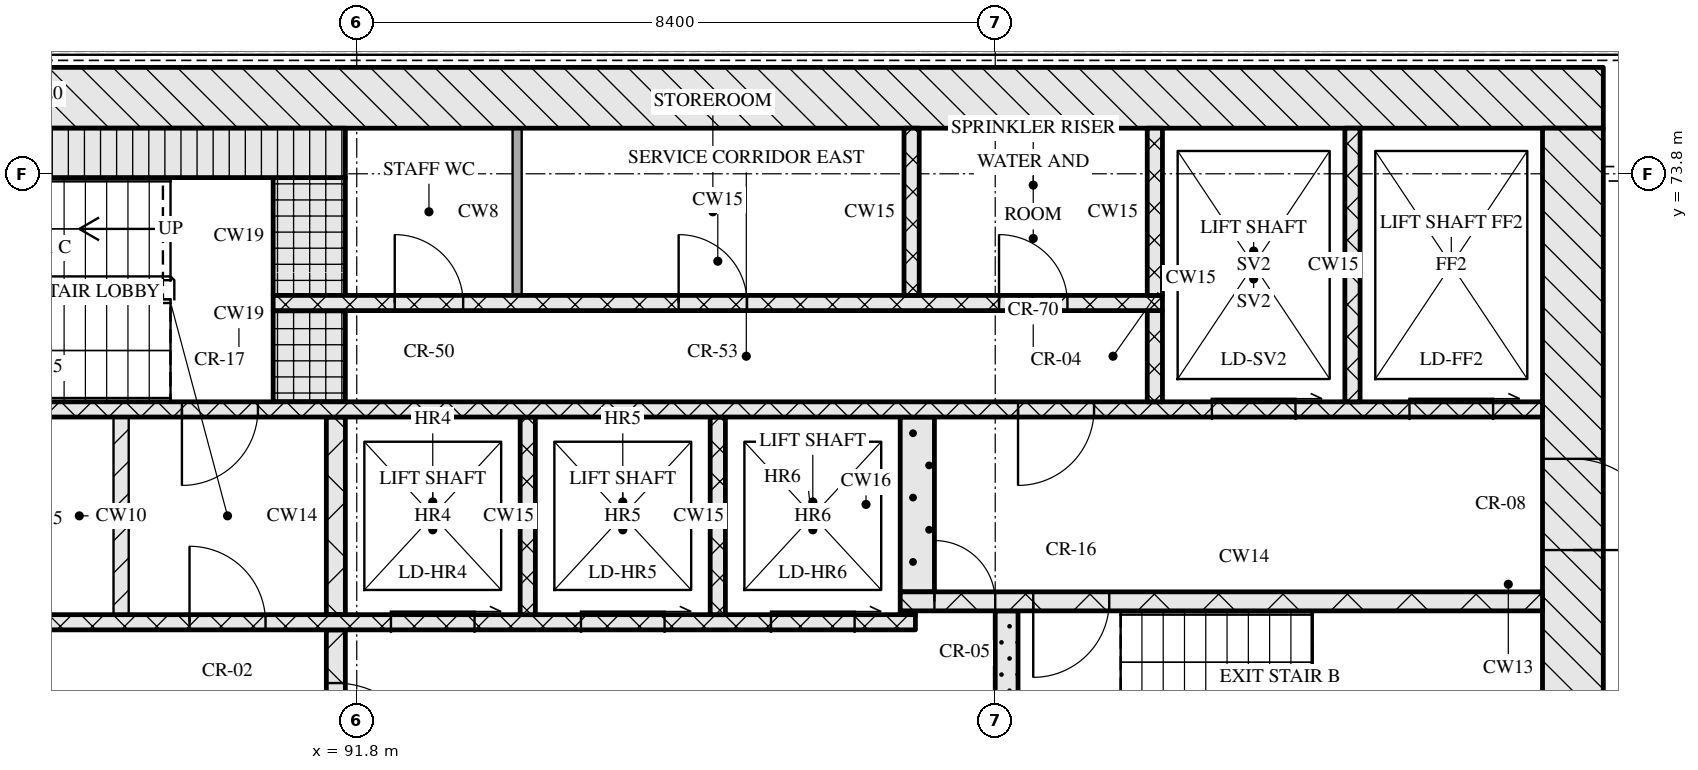
"""IFC4 building model, lengths in metres.
Left out: names, types, materials, properties, quantities, classifications, styles, units other than length and angle.
Written with IfcOpenShell. Run it as: python <this file> out.ifc"""

import sys

from ifc_helpers import new_model, si_unit, direction, frame, frame_2d, origin, place, context, subcontext, project, spatial, rectangle, extrude, element, fill, save


model = new_model("IFC4")
c1 = context("Model", 3, precision=1e-05, world=origin(), true_north=direction((0.0, 1.0)))
c2 = subcontext(c1, "Body", "Model", "MODEL_VIEW")
j1 = project(units=[si_unit("LENGTHUNIT", "METRE"), si_unit("PLANEANGLEUNIT", "RADIAN")], contexts=[c1])
p1 = place(None, origin())
s1 = spatial("IfcSite", under=j1, at=p1, CompositionType="ELEMENT")
p2 = place(p1, origin())
s2 = spatial("IfcBuilding", under=s1, at=p2, CompositionType="ELEMENT")
p3 = place(p2, frame((0.0, 0.0, 161.85)))
s3 = spatial("IfcBuildingStorey", under=s2, at=p3, CompositionType="ELEMENT", Elevation=161.85)
p4 = place(p3, frame((67.0, 74.8, 0.0), z_axis=(0.0, 0.0, 1.0), x_axis=(1.0, 0.0, 0.0)))
e1 = element("IfcWall", 1, at=p4, inside=s3, PredefinedType="SOLIDWALL", context=c2, shape_type="SweptSolid", body=[
    extrude(rectangle(XDim=41.2, YDim=0.8, at=frame_2d((20.6, 0.0))), origin(), (0.0, 0.0, 1.0), 3.32),
])
p5 = place(p3, frame((107.8, 62.4, 0.0), z_axis=(0.0, 0.0, 1.0), x_axis=(0.0, 1.0, 0.0)))
e2 = element("IfcWall", 2, at=p5, inside=s3, PredefinedType="SOLIDWALL", context=c2, shape_type="SweptSolid", body=[
    extrude(rectangle(XDim=12.0, YDim=0.8, at=frame_2d((6.0, 0.0))), origin(), (0.0, 0.0, 1.0), 3.32),
])
p6 = place(p5, frame((6.45, 0.0, 0.0)))
e3 = element("IfcOpeningElement", 3, at=p6, cuts=e2, PredefinedType="OPENING", context=c2, shape_type="SweptSolid", body=[
    extrude(rectangle(XDim=1.2, YDim=2.1, at=frame_2d((0.6, 1.05))), frame((0.0, 0.41, 0.0), z_axis=(0.0, -1.0, 0.0), x_axis=(1.0, 0.0, 0.0)), (0.0, 0.0, 1.0), 0.82),
])
p7 = place(p3, frame((91.525, 65.2, 0.0), z_axis=(0.0, 0.0, 1.0), x_axis=(0.0, 1.0, 0.0)))
e4 = element("IfcWall", 4, at=p7, inside=s3, PredefinedType="SOLIDWALL", context=c2, shape_type="SweptSolid", body=[
    extrude(rectangle(XDim=2.6, YDim=0.25, at=frame_2d((1.3, 0.0))), origin(), (0.0, 0.0, 1.0), 3.32),
])
p8 = place(p7, frame((0.7, 0.0, 0.0)))
e5 = element("IfcOpeningElement", 5, at=p8, cuts=e4, PredefinedType="OPENING", context=c2, shape_type="SweptSolid", body=[
    extrude(rectangle(XDim=1.2, YDim=2.1, at=frame_2d((0.6, 1.05))), frame((0.0, 0.135, 0.0), z_axis=(0.0, -1.0, 0.0), x_axis=(1.0, 0.0, 0.0)), (0.0, 0.0, 1.0), 0.27),
])
p9 = place(p3, frame((100.35, 65.2, 0.0), z_axis=(0.0, 0.0, 1.0), x_axis=(0.0, 1.0, 0.0)))
e6 = element("IfcWall", 6, at=p9, inside=s3, PredefinedType="SOLIDWALL", context=c2, shape_type="SweptSolid", body=[
    extrude(rectangle(XDim=2.85, YDim=0.3, at=frame_2d((1.425, 0.0))), origin(), (0.0, 0.0, 1.0), 3.32),
])
p10 = place(p3, frame((76.05, 67.9, 0.0), z_axis=(0.0, 0.0, 1.0), x_axis=(1.0, 0.0, 0.0)))
e7 = element("IfcWall", 7, at=p10, inside=s3, PredefinedType="SOLIDWALL", context=c2, shape_type="SweptSolid", body=[
    extrude(rectangle(XDim=23.1, YDim=0.2, at=frame_2d((11.55, 0.0))), origin(), (0.0, 0.0, 1.0), 3.32),
])
p11 = place(p10, frame((3.2, 0.0, 0.0)))
e8 = element("IfcOpeningElement", 8, at=p11, cuts=e7, PredefinedType="OPENING", context=c2, shape_type="SweptSolid", body=[
    extrude(rectangle(XDim=0.9, YDim=2.1, at=frame_2d((0.45, 1.05))), frame((0.0, 0.11, 0.0), z_axis=(0.0, -1.0, 0.0), x_axis=(1.0, 0.0, 0.0)), (0.0, 0.0, 1.0), 0.22),
])
p12 = place(p10, frame((9.7, 0.0, 0.0)))
e9 = element("IfcOpeningElement", 9, at=p12, cuts=e7, PredefinedType="OPENING", context=c2, shape_type="SweptSolid", body=[
    extrude(rectangle(XDim=0.9, YDim=2.1, at=frame_2d((0.45, 1.05))), frame((0.0, 0.11, 0.0), z_axis=(0.0, -1.0, 0.0), x_axis=(1.0, 0.0, 0.0)), (0.0, 0.0, 1.0), 0.22),
])
p13 = place(p10, frame((13.55, 0.0, 0.0)))
e10 = element("IfcOpeningElement", 10, at=p13, cuts=e7, PredefinedType="OPENING", context=c2, shape_type="SweptSolid", body=[
    extrude(rectangle(XDim=1.0, YDim=2.1, at=frame_2d((0.5, 1.05))), frame((0.0, 0.11, 0.0), z_axis=(0.0, -1.0, 0.0), x_axis=(1.0, 0.0, 0.0)), (0.0, 0.0, 1.0), 0.22),
])
p14 = place(p10, frame((16.2, 0.0, 0.0)))
e11 = element("IfcOpeningElement", 11, at=p14, cuts=e7, PredefinedType="OPENING", context=c2, shape_type="SweptSolid", body=[
    extrude(rectangle(XDim=1.1, YDim=2.1, at=frame_2d((0.55, 1.05))), frame((0.0, 0.11, 0.0), z_axis=(0.0, -1.0, 0.0), x_axis=(1.0, 0.0, 0.0)), (0.0, 0.0, 1.0), 0.22),
])
p15 = place(p10, frame((18.7, 0.0, 0.0)))
e12 = element("IfcOpeningElement", 12, at=p15, cuts=e7, PredefinedType="OPENING", context=c2, shape_type="SweptSolid", body=[
    extrude(rectangle(XDim=1.1, YDim=2.1, at=frame_2d((0.55, 1.05))), frame((0.0, 0.11, 0.0), z_axis=(0.0, -1.0, 0.0), x_axis=(1.0, 0.0, 0.0)), (0.0, 0.0, 1.0), 0.22),
])
p16 = place(p10, frame((21.2, 0.0, 0.0)))
e13 = element("IfcOpeningElement", 13, at=p16, cuts=e7, PredefinedType="OPENING", context=c2, shape_type="SweptSolid", body=[
    extrude(rectangle(XDim=1.1, YDim=2.1, at=frame_2d((0.55, 1.05))), frame((0.0, 0.11, 0.0), z_axis=(0.0, -1.0, 0.0), x_axis=(1.0, 0.0, 0.0)), (0.0, 0.0, 1.0), 0.22),
])
p17 = place(p3, frame((88.7, 68.0, 0.0), z_axis=(0.0, 0.0, 1.0), x_axis=(0.0, 1.0, 0.0)))
e14 = element("IfcWall", 14, at=p17, inside=s3, PredefinedType="PARTITIONING", context=c2, shape_type="SweptSolid", body=[
    extrude(rectangle(XDim=2.6, YDim=0.2, at=frame_2d((1.3, 0.0))), origin(), (0.0, 0.0, 1.0), 3.32),
])
p18 = place(p3, frame((91.525, 68.0, 0.0), z_axis=(0.0, 0.0, 1.0), x_axis=(0.0, 1.0, 0.0)))
e15 = element("IfcWall", 15, at=p18, inside=s3, PredefinedType="SOLIDWALL", context=c2, shape_type="SweptSolid", body=[
    extrude(rectangle(XDim=2.6, YDim=0.25, at=frame_2d((1.3, 0.0))), origin(), (0.0, 0.0, 1.0), 3.32),
])
for number, where, z_axis, x_axis in (
    (16, (94.05, 68.0, 0.0), (0.0, 0.0, 1.0), (0.0, 1.0, 0.0)),
    (17, (96.55, 68.0, 0.0), (0.0, 0.0, 1.0), (0.0, 1.0, 0.0)),
):
    element("IfcWall", number, at=place(p3, frame(where, z_axis=z_axis, x_axis=x_axis)), inside=s3, PredefinedType="SOLIDWALL", context=c2, shape_type="SweptSolid", body=[
        extrude(rectangle(XDim=2.6, YDim=0.2, at=frame_2d((1.3, 0.0))), origin(), (0.0, 0.0, 1.0), 3.32),
    ])
p19 = place(p3, frame((98.95, 68.025, 0.0), z_axis=(0.0, 0.0, 1.0), x_axis=(1.0, 0.0, 0.0)))
e18 = element("IfcWall", 18, at=p19, inside=s3, PredefinedType="SOLIDWALL", context=c2, shape_type="SweptSolid", body=[
    extrude(rectangle(XDim=0.2, YDim=0.05, at=frame_2d((0.1, 0.0))), origin(), (0.0, 0.0, 1.0), 3.32),
])
p20 = place(p3, frame((98.95, 68.175, 0.0), z_axis=(0.0, 0.0, 1.0), x_axis=(1.0, 0.0, 0.0)))
e19 = element("IfcWall", 19, at=p20, inside=s3, PredefinedType="SOLIDWALL", context=c2, shape_type="SweptSolid", body=[
    extrude(rectangle(XDim=8.45, YDim=0.25, at=frame_2d((4.225, 0.0))), origin(), (0.0, 0.0, 1.0), 3.32),
])
p21 = place(p20, frame((0.45, 0.0, 0.0)))
e20 = element("IfcOpeningElement", 20, at=p21, cuts=e19, PredefinedType="OPENING", context=c2, shape_type="SweptSolid", body=[
    extrude(rectangle(XDim=0.8, YDim=2.1, at=frame_2d((0.4, 1.05))), frame((0.0, 0.135, 0.0), z_axis=(0.0, -1.0, 0.0), x_axis=(1.0, 0.0, 0.0)), (0.0, 0.0, 1.0), 0.27),
])
p22 = place(p20, frame((1.75, 0.0, 0.0)))
e21 = element("IfcOpeningElement", 21, at=p22, cuts=e19, PredefinedType="OPENING", context=c2, shape_type="SweptSolid", body=[
    extrude(rectangle(XDim=1.0, YDim=2.1, at=frame_2d((0.5, 1.05))), frame((0.0, 0.135, 0.0), z_axis=(0.0, -1.0, 0.0), x_axis=(1.0, 0.0, 0.0)), (0.0, 0.0, 1.0), 0.27),
])
p23 = place(p3, frame((99.175, 68.3, 0.0), z_axis=(0.0, 0.0, 1.0), x_axis=(0.0, 1.0, 0.0)))
e22 = element("IfcWall", 22, at=p23, inside=s3, PredefinedType="SOLIDWALL", context=c2, shape_type="SweptSolid", body=[
    extrude(rectangle(XDim=2.3, YDim=0.45, at=frame_2d((1.15, 0.0))), origin(), (0.0, 0.0, 1.0), 3.32),
])
p24 = place(p3, frame((67.8, 70.7, 0.0), z_axis=(0.0, 0.0, 1.0), x_axis=(1.0, 0.0, 0.0)))
e23 = element("IfcWall", 23, at=p24, inside=s3, PredefinedType="SOLIDWALL", context=c2, shape_type="SweptSolid", body=[
    extrude(rectangle(XDim=39.6, YDim=0.2, at=frame_2d((19.8, 0.0))), origin(), (0.0, 0.0, 1.0), 3.32),
])
p25 = place(p24, frame((0.65, 0.0, 0.0)))
e24 = element("IfcOpeningElement", 24, at=p25, cuts=e23, PredefinedType="OPENING", context=c2, shape_type="SweptSolid", body=[
    extrude(rectangle(XDim=1.1, YDim=2.1, at=frame_2d((0.55, 1.05))), frame((0.0, 0.11, 0.0), z_axis=(0.0, -1.0, 0.0), x_axis=(1.0, 0.0, 0.0)), (0.0, 0.0, 1.0), 0.22),
])
p26 = place(p24, frame((3.25, 0.0, 0.0)))
e25 = element("IfcOpeningElement", 25, at=p26, cuts=e23, PredefinedType="OPENING", context=c2, shape_type="SweptSolid", body=[
    extrude(rectangle(XDim=1.1, YDim=2.1, at=frame_2d((0.55, 1.05))), frame((0.0, 0.11, 0.0), z_axis=(0.0, -1.0, 0.0), x_axis=(1.0, 0.0, 0.0)), (0.0, 0.0, 1.0), 0.22),
])
p27 = place(p24, frame((5.9, 0.0, 0.0)))
e26 = element("IfcOpeningElement", 26, at=p27, cuts=e23, PredefinedType="OPENING", context=c2, shape_type="SweptSolid", body=[
    extrude(rectangle(XDim=1.0, YDim=2.1, at=frame_2d((0.5, 1.05))), frame((0.0, 0.11, 0.0), z_axis=(0.0, -1.0, 0.0), x_axis=(1.0, 0.0, 0.0)), (0.0, 0.0, 1.0), 0.22),
])
p28 = place(p24, frame((21.7, 0.0, 0.0)))
e27 = element("IfcOpeningElement", 27, at=p28, cuts=e23, PredefinedType="OPENING", context=c2, shape_type="SweptSolid", body=[
    extrude(rectangle(XDim=1.0, YDim=2.1, at=frame_2d((0.5, 1.05))), frame((0.0, 0.11, 0.0), z_axis=(0.0, -1.0, 0.0), x_axis=(1.0, 0.0, 0.0)), (0.0, 0.0, 1.0), 0.22),
])
p29 = place(p24, frame((32.7, 0.0, 0.0)))
e28 = element("IfcOpeningElement", 28, at=p29, cuts=e23, PredefinedType="OPENING", context=c2, shape_type="SweptSolid", body=[
    extrude(rectangle(XDim=1.0, YDim=2.1, at=frame_2d((0.5, 1.05))), frame((0.0, 0.11, 0.0), z_axis=(0.0, -1.0, 0.0), x_axis=(1.0, 0.0, 0.0)), (0.0, 0.0, 1.0), 0.22),
])
p30 = place(p24, frame((35.25, 0.0, 0.0)))
e29 = element("IfcOpeningElement", 29, at=p30, cuts=e23, PredefinedType="OPENING", context=c2, shape_type="SweptSolid", body=[
    extrude(rectangle(XDim=1.1, YDim=2.1, at=frame_2d((0.55, 1.05))), frame((0.0, 0.11, 0.0), z_axis=(0.0, -1.0, 0.0), x_axis=(1.0, 0.0, 0.0)), (0.0, 0.0, 1.0), 0.22),
])
p31 = place(p24, frame((37.85, 0.0, 0.0)))
e30 = element("IfcOpeningElement", 30, at=p31, cuts=e23, PredefinedType="OPENING", context=c2, shape_type="SweptSolid", body=[
    extrude(rectangle(XDim=1.1, YDim=2.1, at=frame_2d((0.55, 1.05))), frame((0.0, 0.11, 0.0), z_axis=(0.0, -1.0, 0.0), x_axis=(1.0, 0.0, 0.0)), (0.0, 0.0, 1.0), 0.22),
])
p32 = place(p3, frame((91.175, 70.8, 0.0), z_axis=(0.0, 0.0, 1.0), x_axis=(0.0, 1.0, 0.0)))
e31 = element("IfcWall", 31, at=p32, inside=s3, PredefinedType="SOLIDWALL", context=c2, shape_type="SweptSolid", body=[
    extrude(rectangle(XDim=1.2, YDim=0.95, at=frame_2d((0.6, 0.0))), origin(), (0.0, 0.0, 1.0), 3.32),
])
p33 = place(p3, frame((102.3, 70.8, 0.0), z_axis=(0.0, 0.0, 1.0), x_axis=(0.0, 1.0, 0.0)))
e32 = element("IfcWall", 32, at=p33, inside=s3, PredefinedType="SOLIDWALL", context=c2, shape_type="SweptSolid", body=[
    extrude(rectangle(XDim=1.2, YDim=0.2, at=frame_2d((0.6, 0.0))), origin(), (0.0, 0.0, 1.0), 3.32),
])
p34 = place(p3, frame((104.9, 70.8, 0.0), z_axis=(0.0, 0.0, 1.0), x_axis=(0.0, 1.0, 0.0)))
e33 = element("IfcWall", 33, at=p34, inside=s3, PredefinedType="SOLIDWALL", context=c2, shape_type="SweptSolid", body=[
    extrude(rectangle(XDim=3.6, YDim=0.2, at=frame_2d((1.8, 0.0))), origin(), (0.0, 0.0, 1.0), 3.32),
])
p35 = place(p3, frame((90.7, 72.1, 0.0), z_axis=(0.0, 0.0, 1.0), x_axis=(1.0, 0.0, 0.0)))
e34 = element("IfcWall", 34, at=p35, inside=s3, PredefinedType="SOLIDWALL", context=c2, shape_type="SweptSolid", body=[
    extrude(rectangle(XDim=11.7, YDim=0.2, at=frame_2d((5.85, 0.0))), origin(), (0.0, 0.0, 1.0), 3.32),
])
p36 = place(p35, frame((1.6, 0.0, 0.0)))
e35 = element("IfcOpeningElement", 35, at=p36, cuts=e34, PredefinedType="OPENING", context=c2, shape_type="SweptSolid", body=[
    extrude(rectangle(XDim=0.9, YDim=2.1, at=frame_2d((0.45, 1.05))), frame((0.0, 0.11, 0.0), z_axis=(0.0, -1.0, 0.0), x_axis=(1.0, 0.0, 0.0)), (0.0, 0.0, 1.0), 0.22),
])
p37 = place(p35, frame((5.335, 0.0, 0.0)))
e36 = element("IfcOpeningElement", 36, at=p37, cuts=e34, PredefinedType="OPENING", context=c2, shape_type="SweptSolid", body=[
    extrude(rectangle(XDim=0.9, YDim=2.1, at=frame_2d((0.45, 1.05))), frame((0.0, 0.11, 0.0), z_axis=(0.0, -1.0, 0.0), x_axis=(1.0, 0.0, 0.0)), (0.0, 0.0, 1.0), 0.22),
])
p38 = place(p35, frame((9.55, 0.0, 0.0)))
e37 = element("IfcOpeningElement", 37, at=p38, cuts=e34, PredefinedType="OPENING", context=c2, shape_type="SweptSolid", body=[
    extrude(rectangle(XDim=0.9, YDim=2.1, at=frame_2d((0.45, 1.05))), frame((0.0, 0.11, 0.0), z_axis=(0.0, -1.0, 0.0), x_axis=(1.0, 0.0, 0.0)), (0.0, 0.0, 1.0), 0.22),
])
p39 = place(p3, frame((91.175, 72.2, 0.0), z_axis=(0.0, 0.0, 1.0), x_axis=(0.0, 1.0, 0.0)))
e38 = element("IfcWall", 38, at=p39, inside=s3, PredefinedType="SOLIDWALL", context=c2, shape_type="SweptSolid", body=[
    extrude(rectangle(XDim=1.55, YDim=0.95, at=frame_2d((0.775, 0.0))), origin(), (0.0, 0.0, 1.0), 3.32),
])
p40 = place(p3, frame((93.91, 72.2, 0.0), z_axis=(0.0, 0.0, 1.0), x_axis=(0.0, 1.0, 0.0)))
e39 = element("IfcWall", 39, at=p40, inside=s3, PredefinedType="PARTITIONING", context=c2, shape_type="SweptSolid", body=[
    extrude(rectangle(XDim=2.2, YDim=0.12, at=frame_2d((1.1, 0.0))), origin(), (0.0, 0.0, 1.0), 3.32),
])
for number, where, z_axis, x_axis in (
    (40, (99.1, 72.2, 0.0), (0.0, 0.0, 1.0), (0.0, 1.0, 0.0)),
    (41, (102.3, 72.2, 0.0), (0.0, 0.0, 1.0), (0.0, 1.0, 0.0)),
):
    element("IfcWall", number, at=place(p3, frame(where, z_axis=z_axis, x_axis=x_axis)), inside=s3, PredefinedType="SOLIDWALL", context=c2, shape_type="SweptSolid", body=[
        extrude(rectangle(XDim=2.2, YDim=0.2, at=frame_2d((1.1, 0.0))), origin(), (0.0, 0.0, 1.0), 3.32),
    ])
p41 = place(p3, frame((83.55, 74.075, 0.0), z_axis=(0.0, 0.0, 1.0), x_axis=(1.0, 0.0, 0.0)))
e42 = element("IfcWall", 42, at=p41, inside=s3, PredefinedType="SOLIDWALL", context=c2, shape_type="SweptSolid", body=[
    extrude(rectangle(XDim=8.1, YDim=0.65, at=frame_2d((4.05, 0.0))), origin(), (0.0, 0.0, 1.0), 3.32),
])
p42 = place(p8, origin())
e43 = element("IfcDoor", 43, at=p42, inside=s3, OperationType="SINGLE_SWING_RIGHT", PredefinedType="DOOR", context=c2, shape_type="SweptSolid", body=[
    extrude(rectangle(XDim=1.2, YDim=2.1, at=frame_2d((0.6, 1.05))), frame((0.0, 0.025, 0.0), z_axis=(0.0, -1.0, 0.0), x_axis=(1.0, 0.0, 0.0)), (0.0, 0.0, 1.0), 0.05),
])
fill(e5, e43)
p43 = place(p13, origin())
e44 = element("IfcDoor", 44, at=p43, inside=s3, OperationType="SINGLE_SWING_LEFT", PredefinedType="DOOR", context=c2, shape_type="SweptSolid", body=[
    extrude(rectangle(XDim=1.0, YDim=2.1, at=frame_2d((0.5, 1.05))), frame((0.0, 0.025, 0.0), z_axis=(0.0, -1.0, 0.0), x_axis=(1.0, 0.0, 0.0)), (0.0, 0.0, 1.0), 0.05),
])
fill(e10, e44)
p44 = place(p14, origin())
e45 = element("IfcDoor", 45, at=p44, inside=s3, OperationType="SLIDING_TO_RIGHT", PredefinedType="DOOR", context=c2, shape_type="SweptSolid", body=[
    extrude(rectangle(XDim=1.1, YDim=2.1, at=frame_2d((0.55, 1.05))), frame((0.0, 0.025, 0.0), z_axis=(0.0, -1.0, 0.0), x_axis=(1.0, 0.0, 0.0)), (0.0, 0.0, 1.0), 0.05),
])
fill(e11, e45)
p45 = place(p15, origin())
e46 = element("IfcDoor", 46, at=p45, inside=s3, OperationType="SLIDING_TO_RIGHT", PredefinedType="DOOR", context=c2, shape_type="SweptSolid", body=[
    extrude(rectangle(XDim=1.1, YDim=2.1, at=frame_2d((0.55, 1.05))), frame((0.0, 0.025, 0.0), z_axis=(0.0, -1.0, 0.0), x_axis=(1.0, 0.0, 0.0)), (0.0, 0.0, 1.0), 0.05),
])
fill(e12, e46)
p46 = place(p16, origin())
e47 = element("IfcDoor", 47, at=p46, inside=s3, OperationType="SLIDING_TO_RIGHT", PredefinedType="DOOR", context=c2, shape_type="SweptSolid", body=[
    extrude(rectangle(XDim=1.1, YDim=2.1, at=frame_2d((0.55, 1.05))), frame((0.0, 0.025, 0.0), z_axis=(0.0, -1.0, 0.0), x_axis=(1.0, 0.0, 0.0)), (0.0, 0.0, 1.0), 0.05),
])
fill(e13, e47)
p47 = place(p21, origin())
e48 = element("IfcDoor", 48, at=p47, inside=s3, OperationType="SINGLE_SWING_LEFT", PredefinedType="DOOR", context=c2, shape_type="SweptSolid", body=[
    extrude(rectangle(XDim=0.8, YDim=2.1, at=frame_2d((0.4, 1.05))), frame((0.0, 0.025, 0.0), z_axis=(0.0, -1.0, 0.0), x_axis=(1.0, 0.0, 0.0)), (0.0, 0.0, 1.0), 0.05),
])
fill(e20, e48)
p48 = place(p22, origin())
e49 = element("IfcDoor", 49, at=p48, inside=s3, OperationType="SINGLE_SWING_RIGHT", PredefinedType="DOOR", context=c2, shape_type="SweptSolid", body=[
    extrude(rectangle(XDim=1.0, YDim=2.1, at=frame_2d((0.5, 1.05))), frame((0.0, 0.025, 0.0), z_axis=(0.0, -1.0, 0.0), x_axis=(1.0, 0.0, 0.0)), (0.0, 0.0, 1.0), 0.05),
])
fill(e21, e49)
p49 = place(p6, origin())
e50 = element("IfcDoor", 50, at=p49, inside=s3, OperationType="SINGLE_SWING_RIGHT", PredefinedType="DOOR", context=c2, shape_type="SweptSolid", body=[
    extrude(rectangle(XDim=1.2, YDim=2.1, at=frame_2d((0.6, 1.05))), frame((0.0, 0.025, 0.0), z_axis=(0.0, -1.0, 0.0), x_axis=(1.0, 0.0, 0.0)), (0.0, 0.0, 1.0), 0.05),
])
fill(e3, e50)
p50 = place(p28, origin())
e51 = element("IfcDoor", 51, at=p50, inside=s3, OperationType="SINGLE_SWING_RIGHT", PredefinedType="DOOR", context=c2, shape_type="SweptSolid", body=[
    extrude(rectangle(XDim=1.0, YDim=2.1, at=frame_2d((0.5, 1.05))), frame((0.0, 0.025, 0.0), z_axis=(0.0, -1.0, 0.0), x_axis=(1.0, 0.0, 0.0)), (0.0, 0.0, 1.0), 0.05),
])
fill(e27, e51)
p51 = place(p29, origin())
e52 = element("IfcDoor", 52, at=p51, inside=s3, OperationType="SINGLE_SWING_RIGHT", PredefinedType="DOOR", context=c2, shape_type="SweptSolid", body=[
    extrude(rectangle(XDim=1.0, YDim=2.1, at=frame_2d((0.5, 1.05))), frame((0.0, 0.025, 0.0), z_axis=(0.0, -1.0, 0.0), x_axis=(1.0, 0.0, 0.0)), (0.0, 0.0, 1.0), 0.05),
])
fill(e28, e52)
p52 = place(p30, origin())
e53 = element("IfcDoor", 53, at=p52, inside=s3, OperationType="SLIDING_TO_RIGHT", PredefinedType="DOOR", context=c2, shape_type="SweptSolid", body=[
    extrude(rectangle(XDim=1.1, YDim=2.1, at=frame_2d((0.55, 1.05))), frame((0.0, 0.025, 0.0), z_axis=(0.0, -1.0, 0.0), x_axis=(1.0, 0.0, 0.0)), (0.0, 0.0, 1.0), 0.05),
])
fill(e29, e53)
p53 = place(p31, origin())
e54 = element("IfcDoor", 54, at=p53, inside=s3, OperationType="SLIDING_TO_RIGHT", PredefinedType="DOOR", context=c2, shape_type="SweptSolid", body=[
    extrude(rectangle(XDim=1.1, YDim=2.1, at=frame_2d((0.55, 1.05))), frame((0.0, 0.025, 0.0), z_axis=(0.0, -1.0, 0.0), x_axis=(1.0, 0.0, 0.0)), (0.0, 0.0, 1.0), 0.05),
])
fill(e30, e54)
p54 = place(p36, origin())
e55 = element("IfcDoor", 55, at=p54, inside=s3, OperationType="SINGLE_SWING_LEFT", PredefinedType="DOOR", context=c2, shape_type="SweptSolid", body=[
    extrude(rectangle(XDim=0.9, YDim=2.1, at=frame_2d((0.45, 1.05))), frame((0.0, 0.025, 0.0), z_axis=(0.0, -1.0, 0.0), x_axis=(1.0, 0.0, 0.0)), (0.0, 0.0, 1.0), 0.05),
])
fill(e35, e55)
p55 = place(p37, origin())
e56 = element("IfcDoor", 56, at=p55, inside=s3, OperationType="SINGLE_SWING_LEFT", PredefinedType="DOOR", context=c2, shape_type="SweptSolid", body=[
    extrude(rectangle(XDim=0.9, YDim=2.1, at=frame_2d((0.45, 1.05))), frame((0.0, 0.025, 0.0), z_axis=(0.0, -1.0, 0.0), x_axis=(1.0, 0.0, 0.0)), (0.0, 0.0, 1.0), 0.05),
])
fill(e36, e56)
p56 = place(p38, origin())
e57 = element("IfcDoor", 57, at=p56, inside=s3, OperationType="SINGLE_SWING_LEFT", PredefinedType="DOOR", context=c2, shape_type="SweptSolid", body=[
    extrude(rectangle(XDim=0.9, YDim=2.1, at=frame_2d((0.45, 1.05))), frame((0.0, 0.025, 0.0), z_axis=(0.0, -1.0, 0.0), x_axis=(1.0, 0.0, 0.0)), (0.0, 0.0, 1.0), 0.05),
])
fill(e37, e57)
save(model, sys.argv[1])
